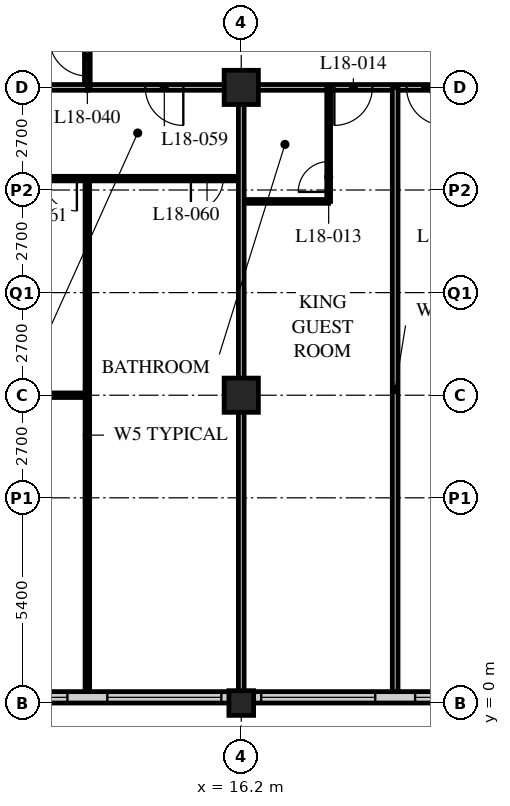
"""IFC4 building model, lengths in metres.
Left out: names, types, materials, properties, quantities, classifications, styles, units other than length and angle.
Written with IfcOpenShell. Run it as: python <this file> out.ifc"""

import sys

from ifc_helpers import new_model, si_unit, direction, frame, frame_2d, origin, origin_2d, place, context, subcontext, project, spatial, rectangle, hollow_rectangle, extrude, element, fill, save


model = new_model("IFC4")
c1 = context("Model", 3, precision=1e-05, world=origin(), true_north=direction((0.0, 1.0)))
c2 = subcontext(c1, "Body", "Model", "MODEL_VIEW")
j1 = project(units=[si_unit("LENGTHUNIT", "METRE"), si_unit("PLANEANGLEUNIT", "RADIAN")], contexts=[c1])
p1 = place(None, origin())
s1 = spatial("IfcSite", under=j1, at=p1, CompositionType="ELEMENT")
p2 = place(p1, origin())
s2 = spatial("IfcBuilding", under=s1, at=p2, CompositionType="ELEMENT")
p3 = place(p2, frame((0.0, 0.0, 73.8)))
s3 = spatial("IfcBuildingStorey", under=s2, at=p3, CompositionType="ELEMENT", Elevation=73.8)
p4 = place(p3, frame((16.2, 0.0, 0.0), z_axis=(0.0, 0.0, 1.0), x_axis=(1.0, 0.0, 0.0)))
e1 = element("IfcColumn", 1, at=p4, inside=s3, PredefinedType="COLUMN", context=c2, shape_type="SweptSolid", body=[
    extrude(hollow_rectangle(XDim=0.65, YDim=0.65, WallThickness=0.05, at=origin_2d()), origin(), (0.0, 0.0, 1.0), 3.4),
])
for number, where, z_axis, x_axis in (
    (2, (16.2, 8.1, 0.0), (0.0, 0.0, 1.0), (1.0, 0.0, 0.0)),
    (3, (16.2, 16.2, 0.0), (0.0, 0.0, 1.0), (1.0, 0.0, 0.0)),
):
    element("IfcColumn", number, at=place(p3, frame(where, z_axis=z_axis, x_axis=x_axis)), inside=s3, PredefinedType="COLUMN", context=c2, shape_type="SweptSolid", body=[
        extrude(hollow_rectangle(XDim=0.9, YDim=0.9, WallThickness=0.09, at=origin_2d()), origin(), (0.0, 0.0, 1.0), 3.4),
    ])
p5 = place(p3, frame((8.4, 0.15, 0.0), z_axis=(0.0, 0.0, 1.0), x_axis=(1.0, 0.0, 0.0)))
e4 = element("IfcWall", 4, at=p5, inside=s3, PredefinedType="SOLIDWALL", context=c2, shape_type="SweptSolid", body=[
    extrude(rectangle(XDim=40.2, YDim=0.3, at=frame_2d((20.1, 0.0))), origin(), (0.0, 0.0, 1.0), 3.19),
])
p6 = place(p5, frame((0.225, 0.0, 0.9)))
e5 = element("IfcOpeningElement", 5, at=p6, cuts=e4, PredefinedType="OPENING", context=c2, shape_type="SweptSolid", body=[
    extrude(rectangle(XDim=3.0, YDim=2.0, at=frame_2d((1.5, 1.0))), frame((0.0, 0.16, 0.0), z_axis=(0.0, -1.0, 0.0), x_axis=(1.0, 0.0, 0.0)), (0.0, 0.0, 1.0), 0.32),
])
p7 = place(p5, frame((4.275, 0.0, 0.9)))
e6 = element("IfcOpeningElement", 6, at=p7, cuts=e4, PredefinedType="OPENING", context=c2, shape_type="SweptSolid", body=[
    extrude(rectangle(XDim=3.0, YDim=2.0, at=frame_2d((1.5, 1.0))), frame((0.0, 0.16, 0.0), z_axis=(0.0, -1.0, 0.0), x_axis=(1.0, 0.0, 0.0)), (0.0, 0.0, 1.0), 0.32),
])
p8 = place(p5, frame((8.325, 0.0, 0.9)))
e7 = element("IfcOpeningElement", 7, at=p8, cuts=e4, PredefinedType="OPENING", context=c2, shape_type="SweptSolid", body=[
    extrude(rectangle(XDim=3.0, YDim=2.0, at=frame_2d((1.5, 1.0))), frame((0.0, 0.16, 0.0), z_axis=(0.0, -1.0, 0.0), x_axis=(1.0, 0.0, 0.0)), (0.0, 0.0, 1.0), 0.32),
])
p9 = place(p5, frame((12.375, 0.0, 0.9)))
e8 = element("IfcOpeningElement", 8, at=p9, cuts=e4, PredefinedType="OPENING", context=c2, shape_type="SweptSolid", body=[
    extrude(rectangle(XDim=3.0, YDim=2.0, at=frame_2d((1.5, 1.0))), frame((0.0, 0.16, 0.0), z_axis=(0.0, -1.0, 0.0), x_axis=(1.0, 0.0, 0.0)), (0.0, 0.0, 1.0), 0.32),
])
p10 = place(p5, frame((16.425, 0.0, 0.9)))
e9 = element("IfcOpeningElement", 9, at=p10, cuts=e4, PredefinedType="OPENING", context=c2, shape_type="SweptSolid", body=[
    extrude(rectangle(XDim=3.0, YDim=2.0, at=frame_2d((1.5, 1.0))), frame((0.0, 0.16, 0.0), z_axis=(0.0, -1.0, 0.0), x_axis=(1.0, 0.0, 0.0)), (0.0, 0.0, 1.0), 0.32),
])
p11 = place(p5, frame((20.475, 0.0, 0.9)))
e10 = element("IfcOpeningElement", 10, at=p11, cuts=e4, PredefinedType="OPENING", context=c2, shape_type="SweptSolid", body=[
    extrude(rectangle(XDim=3.0, YDim=2.0, at=frame_2d((1.5, 1.0))), frame((0.0, 0.16, 0.0), z_axis=(0.0, -1.0, 0.0), x_axis=(1.0, 0.0, 0.0)), (0.0, 0.0, 1.0), 0.32),
])
p12 = place(p5, frame((24.525, 0.0, 0.9)))
e11 = element("IfcOpeningElement", 11, at=p12, cuts=e4, PredefinedType="OPENING", context=c2, shape_type="SweptSolid", body=[
    extrude(rectangle(XDim=3.0, YDim=2.0, at=frame_2d((1.5, 1.0))), frame((0.0, 0.16, 0.0), z_axis=(0.0, -1.0, 0.0), x_axis=(1.0, 0.0, 0.0)), (0.0, 0.0, 1.0), 0.32),
])
p13 = place(p5, frame((28.575, 0.0, 0.9)))
e12 = element("IfcOpeningElement", 12, at=p13, cuts=e4, PredefinedType="OPENING", context=c2, shape_type="SweptSolid", body=[
    extrude(rectangle(XDim=3.0, YDim=2.0, at=frame_2d((1.5, 1.0))), frame((0.0, 0.16, 0.0), z_axis=(0.0, -1.0, 0.0), x_axis=(1.0, 0.0, 0.0)), (0.0, 0.0, 1.0), 0.32),
])
p14 = place(p5, frame((32.625, 0.0, 0.9)))
e13 = element("IfcOpeningElement", 13, at=p14, cuts=e4, PredefinedType="OPENING", context=c2, shape_type="SweptSolid", body=[
    extrude(rectangle(XDim=3.0, YDim=2.0, at=frame_2d((1.5, 1.0))), frame((0.0, 0.16, 0.0), z_axis=(0.0, -1.0, 0.0), x_axis=(1.0, 0.0, 0.0)), (0.0, 0.0, 1.0), 0.32),
])
p15 = place(p5, frame((36.675, 0.0, 0.9)))
e14 = element("IfcOpeningElement", 14, at=p15, cuts=e4, PredefinedType="OPENING", context=c2, shape_type="SweptSolid", body=[
    extrude(rectangle(XDim=3.0, YDim=2.0, at=frame_2d((1.5, 1.0))), frame((0.0, 0.16, 0.0), z_axis=(0.0, -1.0, 0.0), x_axis=(1.0, 0.0, 0.0)), (0.0, 0.0, 1.0), 0.32),
])
p16 = place(p3, frame((12.15, 16.2, 0.0), z_axis=(0.0, 0.0, 1.0), x_axis=(1.0, 0.0, 0.0)))
e15 = element("IfcWall", 15, at=p16, inside=s3, PredefinedType="PARTITIONING", context=c2, shape_type="SweptSolid", body=[
    extrude(rectangle(XDim=36.45, YDim=0.15, at=frame_2d((18.225, 0.0))), origin(), (0.0, 0.0, 1.0), 2.578),
])
p17 = place(p16, frame((6.5, 0.0, 0.0)))
e16 = element("IfcOpeningElement", 16, at=p17, cuts=e15, PredefinedType="OPENING", context=c2, shape_type="SweptSolid", body=[
    extrude(rectangle(XDim=1.0, YDim=2.1, at=frame_2d((0.5, 1.05))), frame((0.0, 0.085, 0.0), z_axis=(0.0, -1.0, 0.0), x_axis=(1.0, 0.0, 0.0)), (0.0, 0.0, 1.0), 0.17),
])
p18 = place(p16, frame((8.4, 0.0, 0.0)))
e17 = element("IfcOpeningElement", 17, at=p18, cuts=e15, PredefinedType="OPENING", context=c2, shape_type="SweptSolid", body=[
    extrude(rectangle(XDim=1.0, YDim=2.1, at=frame_2d((0.5, 1.05))), frame((0.0, 0.085, 0.0), z_axis=(0.0, -1.0, 0.0), x_axis=(1.0, 0.0, 0.0)), (0.0, 0.0, 1.0), 0.17),
])
p19 = place(p16, frame((14.9, 0.0, 0.0)))
e18 = element("IfcOpeningElement", 18, at=p19, cuts=e15, PredefinedType="OPENING", context=c2, shape_type="SweptSolid", body=[
    extrude(rectangle(XDim=1.0, YDim=2.1, at=frame_2d((0.5, 1.05))), frame((0.0, 0.085, 0.0), z_axis=(0.0, -1.0, 0.0), x_axis=(1.0, 0.0, 0.0)), (0.0, 0.0, 1.0), 0.17),
])
p20 = place(p16, frame((16.5, 0.0, 0.0)))
e19 = element("IfcOpeningElement", 19, at=p20, cuts=e15, PredefinedType="OPENING", context=c2, shape_type="SweptSolid", body=[
    extrude(rectangle(XDim=1.0, YDim=2.1, at=frame_2d((0.5, 1.05))), frame((0.0, 0.085, 0.0), z_axis=(0.0, -1.0, 0.0), x_axis=(1.0, 0.0, 0.0)), (0.0, 0.0, 1.0), 0.17),
])
p21 = place(p16, frame((22.7, 0.0, 0.0)))
e20 = element("IfcOpeningElement", 20, at=p21, cuts=e15, PredefinedType="OPENING", context=c2, shape_type="SweptSolid", body=[
    extrude(rectangle(XDim=1.0, YDim=2.1, at=frame_2d((0.5, 1.05))), frame((0.0, 0.085, 0.0), z_axis=(0.0, -1.0, 0.0), x_axis=(1.0, 0.0, 0.0)), (0.0, 0.0, 1.0), 0.17),
])
p22 = place(p16, frame((24.9, 0.0, 0.0)))
e21 = element("IfcOpeningElement", 21, at=p22, cuts=e15, PredefinedType="OPENING", context=c2, shape_type="SweptSolid", body=[
    extrude(rectangle(XDim=1.0, YDim=2.1, at=frame_2d((0.5, 1.05))), frame((0.0, 0.085, 0.0), z_axis=(0.0, -1.0, 0.0), x_axis=(1.0, 0.0, 0.0)), (0.0, 0.0, 1.0), 0.17),
])
p23 = place(p16, frame((30.8, 0.0, 0.0)))
e22 = element("IfcOpeningElement", 22, at=p23, cuts=e15, PredefinedType="OPENING", context=c2, shape_type="SweptSolid", body=[
    extrude(rectangle(XDim=1.0, YDim=2.1, at=frame_2d((0.5, 1.05))), frame((0.0, 0.085, 0.0), z_axis=(0.0, -1.0, 0.0), x_axis=(1.0, 0.0, 0.0)), (0.0, 0.0, 1.0), 0.17),
])
p24 = place(p16, frame((1.525, 0.0, 0.0)))
e23 = element("IfcOpeningElement", 23, at=p24, cuts=e15, PredefinedType="OPENING", context=c2, shape_type="SweptSolid", body=[
    extrude(rectangle(XDim=1.0, YDim=2.1, at=frame_2d((0.5, 1.05))), frame((0.0, 0.085, 0.0), z_axis=(0.0, -1.0, 0.0), x_axis=(1.0, 0.0, 0.0)), (0.0, 0.0, 1.0), 0.17),
])
p25 = place(p16, frame((33.925, 0.0, 0.0)))
e24 = element("IfcOpeningElement", 24, at=p25, cuts=e15, PredefinedType="OPENING", context=c2, shape_type="SweptSolid", body=[
    extrude(rectangle(XDim=1.0, YDim=2.1, at=frame_2d((0.5, 1.05))), frame((0.0, 0.085, 0.0), z_axis=(0.0, -1.0, 0.0), x_axis=(1.0, 0.0, 0.0)), (0.0, 0.0, 1.0), 0.17),
])
p26 = place(p3, frame((12.15, 16.2, 0.0), z_axis=(0.0, 0.0, 1.0), x_axis=(0.0, 1.0, 0.0)))
e25 = element("IfcWall", 25, at=p26, inside=s3, PredefinedType="PARTITIONING", context=c2, shape_type="SweptSolid", body=[
    extrude(rectangle(XDim=26.1, YDim=0.15, at=frame_2d((13.05, 0.0))), origin(), (0.0, 0.0, 1.0), 3.19),
])
p27 = place(p26, frame((0.3, 0.0, 0.0)))
e26 = element("IfcOpeningElement", 26, at=p27, cuts=e25, PredefinedType="OPENING", context=c2, shape_type="SweptSolid", body=[
    extrude(rectangle(XDim=1.0, YDim=2.1, at=frame_2d((0.5, 1.05))), frame((0.0, 0.085, 0.0), z_axis=(0.0, -1.0, 0.0), x_axis=(1.0, 0.0, 0.0)), (0.0, 0.0, 1.0), 0.17),
])
p28 = place(p26, frame((6.5, 0.0, 0.0)))
e27 = element("IfcOpeningElement", 27, at=p28, cuts=e25, PredefinedType="OPENING", context=c2, shape_type="SweptSolid", body=[
    extrude(rectangle(XDim=1.0, YDim=2.1, at=frame_2d((0.5, 1.05))), frame((0.0, 0.085, 0.0), z_axis=(0.0, -1.0, 0.0), x_axis=(1.0, 0.0, 0.0)), (0.0, 0.0, 1.0), 0.17),
])
p29 = place(p26, frame((13.55, 0.0, 0.0)))
e28 = element("IfcOpeningElement", 28, at=p29, cuts=e25, PredefinedType="OPENING", context=c2, shape_type="SweptSolid", body=[
    extrude(rectangle(XDim=1.0, YDim=2.1, at=frame_2d((0.5, 1.05))), frame((0.0, 0.085, 0.0), z_axis=(0.0, -1.0, 0.0), x_axis=(1.0, 0.0, 0.0)), (0.0, 0.0, 1.0), 0.17),
])
p30 = place(p26, frame((21.65, 0.0, 0.0)))
e29 = element("IfcOpeningElement", 29, at=p30, cuts=e25, PredefinedType="OPENING", context=c2, shape_type="SweptSolid", body=[
    extrude(rectangle(XDim=1.0, YDim=2.1, at=frame_2d((0.5, 1.05))), frame((0.0, 0.085, 0.0), z_axis=(0.0, -1.0, 0.0), x_axis=(1.0, 0.0, 0.0)), (0.0, 0.0, 1.0), 0.17),
])
p31 = place(p3, frame((16.2, 13.2, 0.0), z_axis=(0.0, 0.0, 1.0), x_axis=(1.0, 0.0, 0.0)))
e30 = element("IfcWall", 30, at=p31, inside=s3, PredefinedType="PARTITIONING", context=c2, shape_type="SweptSolid", body=[
    extrude(rectangle(XDim=2.3, YDim=0.1, at=frame_2d((1.15, 0.0))), origin(), (0.0, 0.0, 1.0), 3.19),
])
p32 = place(p3, frame((18.5, 16.2, 0.0), z_axis=(0.0, 0.0, 1.0), x_axis=(0.0, -1.0, 0.0)))
e31 = element("IfcWall", 31, at=p32, inside=s3, PredefinedType="PARTITIONING", context=c2, shape_type="SweptSolid", body=[
    extrude(rectangle(XDim=3.0, YDim=0.1, at=frame_2d((1.5, 0.0))), origin(), (0.0, 0.0, 1.0), 3.19),
])
p33 = place(p32, frame((1.95, 0.0, 0.0)))
e32 = element("IfcOpeningElement", 32, at=p33, cuts=e31, PredefinedType="OPENING", context=c2, shape_type="SweptSolid", body=[
    extrude(rectangle(XDim=0.8, YDim=2.1, at=frame_2d((0.4, 1.05))), frame((0.0, 0.06, 0.0), z_axis=(0.0, -1.0, 0.0), x_axis=(1.0, 0.0, 0.0)), (0.0, 0.0, 1.0), 0.12),
])
p34 = place(p3, frame((20.25, 16.2, 0.0), z_axis=(0.0, 0.0, 1.0), x_axis=(0.0, -1.0, 0.0)))
e33 = element("IfcWall", 33, at=p34, inside=s3, PredefinedType="PARTITIONING", context=c2, shape_type="SweptSolid", body=[
    extrude(rectangle(XDim=15.9, YDim=0.15, at=frame_2d((7.95, 0.0))), origin(), (0.0, 0.0, 1.0), 3.19),
])
p35 = place(p3, frame((8.15, 13.8, 0.0), z_axis=(0.0, 0.0, 1.0), x_axis=(1.0, 0.0, 0.0)))
e34 = element("IfcWall", 34, at=p35, inside=s3, PredefinedType="PARTITIONING", context=c2, shape_type="SweptSolid", body=[
    extrude(rectangle(XDim=8.05, YDim=0.12, at=frame_2d((4.025, 0.0))), origin(), (0.0, 0.0, 1.0), 3.19),
])
p36 = place(p35, frame((6.725, 0.0, 0.0)))
e35 = element("IfcOpeningElement", 35, at=p36, cuts=e34, PredefinedType="OPENING", context=c2, shape_type="SweptSolid", body=[
    extrude(rectangle(XDim=0.85, YDim=2.1, at=frame_2d((0.425, 1.05))), frame((0.0, 0.07, 0.0), z_axis=(0.0, -1.0, 0.0), x_axis=(1.0, 0.0, 0.0)), (0.0, 0.0, 1.0), 0.14),
])
p37 = place(p35, frame((2.875, 0.0, 0.0)))
e36 = element("IfcOpeningElement", 36, at=p37, cuts=e34, PredefinedType="OPENING", context=c2, shape_type="SweptSolid", body=[
    extrude(rectangle(XDim=0.85, YDim=2.1, at=frame_2d((0.425, 1.05))), frame((0.0, 0.07, 0.0), z_axis=(0.0, -1.0, 0.0), x_axis=(1.0, 0.0, 0.0)), (0.0, 0.0, 1.0), 0.14),
])
p38 = place(p3, frame((12.15, 13.8, 0.0), z_axis=(0.0, 0.0, 1.0), x_axis=(0.0, -1.0, 0.0)))
e37 = element("IfcWall", 37, at=p38, inside=s3, PredefinedType="PARTITIONING", context=c2, shape_type="SweptSolid", body=[
    extrude(rectangle(XDim=13.5, YDim=0.12, at=frame_2d((6.75, 0.0))), origin(), (0.0, 0.0, 1.0), 3.19),
])
p39 = place(p3, frame((0.3, 16.2, 0.0), z_axis=(0.0, 0.0, 1.0), x_axis=(1.0, 0.0, 0.0)))
e38 = element("IfcWall", 38, at=p39, inside=s3, PredefinedType="PARTITIONING", context=c2, shape_type="SweptSolid", body=[
    extrude(rectangle(XDim=11.85, YDim=0.15, at=frame_2d((5.925, 0.0))), origin(), (0.0, 0.0, 1.0), 2.578),
])
p40 = place(p3, frame((16.2, 16.2, 0.0), z_axis=(0.0, 0.0, 1.0), x_axis=(0.0, -1.0, 0.0)))
e39 = element("IfcWall", 39, at=p40, inside=s3, PredefinedType="PARTITIONING", context=c2, shape_type="SweptSolid", body=[
    extrude(rectangle(XDim=15.9, YDim=0.15, at=frame_2d((7.95, 0.0))), origin(), (0.0, 0.0, 1.0), 2.578),
])
p41 = place(p3, frame((12.15, 8.1, 0.0), z_axis=(0.0, 0.0, 1.0), x_axis=(-1.0, 0.0, 0.0)))
e40 = element("IfcWall", 40, at=p41, inside=s3, PredefinedType="PARTITIONING", context=c2, shape_type="SweptSolid", body=[
    extrude(rectangle(XDim=3.6, YDim=0.12, at=frame_2d((1.8, 0.0))), origin(), (0.0, 0.0, 1.0), 2.578),
])
p42 = place(p6, origin())
e41 = element("IfcWindow", 41, at=p42, inside=s3, PartitioningType="SINGLE_PANEL", PredefinedType="WINDOW", context=c2, shape_type="SweptSolid", body=[
    extrude(rectangle(XDim=3.0, YDim=2.0, at=frame_2d((1.5, 1.0))), frame((0.0, 0.03, 0.0), z_axis=(0.0, -1.0, 0.0), x_axis=(1.0, 0.0, 0.0)), (0.0, 0.0, 1.0), 0.06),
])
fill(e5, e41)
p43 = place(p7, origin())
e42 = element("IfcWindow", 42, at=p43, inside=s3, PartitioningType="SINGLE_PANEL", PredefinedType="WINDOW", context=c2, shape_type="SweptSolid", body=[
    extrude(rectangle(XDim=3.0, YDim=2.0, at=frame_2d((1.5, 1.0))), frame((0.0, 0.03, 0.0), z_axis=(0.0, -1.0, 0.0), x_axis=(1.0, 0.0, 0.0)), (0.0, 0.0, 1.0), 0.06),
])
fill(e6, e42)
p44 = place(p8, origin())
e43 = element("IfcWindow", 43, at=p44, inside=s3, PartitioningType="SINGLE_PANEL", PredefinedType="WINDOW", context=c2, shape_type="SweptSolid", body=[
    extrude(rectangle(XDim=3.0, YDim=2.0, at=frame_2d((1.5, 1.0))), frame((0.0, 0.03, 0.0), z_axis=(0.0, -1.0, 0.0), x_axis=(1.0, 0.0, 0.0)), (0.0, 0.0, 1.0), 0.06),
])
fill(e7, e43)
p45 = place(p9, origin())
e44 = element("IfcWindow", 44, at=p45, inside=s3, PartitioningType="SINGLE_PANEL", PredefinedType="WINDOW", context=c2, shape_type="SweptSolid", body=[
    extrude(rectangle(XDim=3.0, YDim=2.0, at=frame_2d((1.5, 1.0))), frame((0.0, 0.03, 0.0), z_axis=(0.0, -1.0, 0.0), x_axis=(1.0, 0.0, 0.0)), (0.0, 0.0, 1.0), 0.06),
])
fill(e8, e44)
p46 = place(p33, origin())
e45 = element("IfcDoor", 45, at=p46, inside=s3, OperationType="SINGLE_SWING_LEFT", PredefinedType="DOOR", context=c2, shape_type="SweptSolid", body=[
    extrude(rectangle(XDim=0.8, YDim=2.1, at=frame_2d((0.4, 1.05))), frame((0.0, 0.025, 0.0), z_axis=(0.0, -1.0, 0.0), x_axis=(1.0, 0.0, 0.0)), (0.0, 0.0, 1.0), 0.05),
])
fill(e32, e45)
p47 = place(p17, origin())
e46 = element("IfcDoor", 46, at=p47, inside=s3, OperationType="SINGLE_SWING_RIGHT", PredefinedType="DOOR", context=c2, shape_type="SweptSolid", body=[
    extrude(rectangle(XDim=1.0, YDim=2.1, at=frame_2d((0.5, 1.05))), frame((0.0, 0.025, 0.0), z_axis=(0.0, -1.0, 0.0), x_axis=(1.0, 0.0, 0.0)), (0.0, 0.0, 1.0), 0.05),
])
fill(e16, e46)
p48 = place(p18, origin())
e47 = element("IfcDoor", 47, at=p48, inside=s3, OperationType="SINGLE_SWING_LEFT", PredefinedType="DOOR", context=c2, shape_type="SweptSolid", body=[
    extrude(rectangle(XDim=1.0, YDim=2.1, at=frame_2d((0.5, 1.05))), frame((0.0, 0.025, 0.0), z_axis=(0.0, -1.0, 0.0), x_axis=(1.0, 0.0, 0.0)), (0.0, 0.0, 1.0), 0.05),
])
fill(e17, e47)
p49 = place(p27, origin())
e48 = element("IfcDoor", 48, at=p49, inside=s3, OperationType="SINGLE_SWING_RIGHT", PredefinedType="DOOR", context=c2, shape_type="SweptSolid", body=[
    extrude(rectangle(XDim=1.0, YDim=2.1, at=frame_2d((0.5, 1.05))), frame((0.0, 0.025, 0.0), z_axis=(0.0, -1.0, 0.0), x_axis=(1.0, 0.0, 0.0)), (0.0, 0.0, 1.0), 0.05),
])
fill(e26, e48)
p50 = place(p24, origin())
e49 = element("IfcDoor", 49, at=p50, inside=s3, OperationType="SINGLE_SWING_LEFT", PredefinedType="DOOR", context=c2, shape_type="SweptSolid", body=[
    extrude(rectangle(XDim=1.0, YDim=2.1, at=frame_2d((0.5, 1.05))), frame((0.0, 0.025, 0.0), z_axis=(0.0, -1.0, 0.0), x_axis=(1.0, 0.0, 0.0)), (0.0, 0.0, 1.0), 0.05),
])
fill(e23, e49)
p51 = place(p36, origin())
e50 = element("IfcDoor", 50, at=p51, inside=s3, OperationType="SINGLE_SWING_RIGHT", PredefinedType="DOOR", context=c2, shape_type="SweptSolid", body=[
    extrude(rectangle(XDim=0.85, YDim=2.1, at=frame_2d((0.425, 1.05))), frame((0.0, 0.025, 0.0), z_axis=(0.0, -1.0, 0.0), x_axis=(1.0, 0.0, 0.0)), (0.0, 0.0, 1.0), 0.05),
])
fill(e35, e50)
p52 = place(p37, origin())
e51 = element("IfcDoor", 51, at=p52, inside=s3, OperationType="SINGLE_SWING_LEFT", PredefinedType="DOOR", context=c2, shape_type="SweptSolid", body=[
    extrude(rectangle(XDim=0.85, YDim=2.1, at=frame_2d((0.425, 1.05))), frame((0.0, 0.025, 0.0), z_axis=(0.0, -1.0, 0.0), x_axis=(1.0, 0.0, 0.0)), (0.0, 0.0, 1.0), 0.05),
])
fill(e36, e51)
save(model, sys.argv[1])
